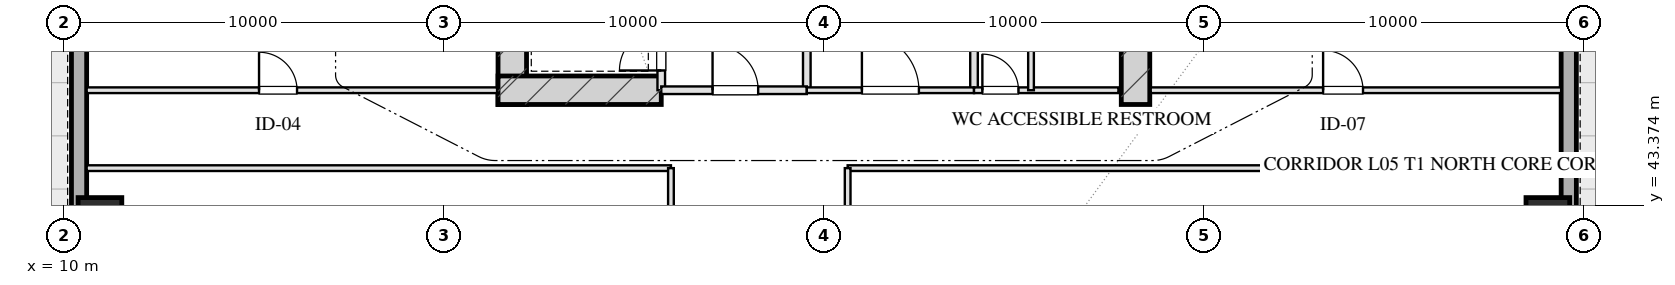
"""IFC4 building model, lengths in metres.
Left out: names, types, materials, properties, quantities, classifications, styles, units other than length and angle.
Written with IfcOpenShell. Run it as: python <this file> out.ifc"""

import sys

from ifc_helpers import new_model, si_unit, direction, frame, frame_2d, origin, origin_2d, place, context, subcontext, project, spatial, rectangle, hollow_rectangle, extrude, element, fill, save


model = new_model("IFC4")
c1 = context("Model", 3, precision=1e-05, world=origin(), true_north=direction((0.0, 1.0)))
c2 = subcontext(c1, "Body", "Model", "MODEL_VIEW")
j1 = project(units=[si_unit("LENGTHUNIT", "METRE"), si_unit("PLANEANGLEUNIT", "RADIAN")], contexts=[c1])
p1 = place(None, origin())
s1 = spatial("IfcSite", under=j1, at=p1, CompositionType="ELEMENT")
p2 = place(p1, origin())
s2 = spatial("IfcBuilding", under=s1, at=p2, CompositionType="ELEMENT")
p3 = place(p2, frame((0.0, 0.0, 26.0)))
s3 = spatial("IfcBuildingStorey", under=s2, at=p3, CompositionType="ELEMENT", Elevation=26.0)
for number, where, z_axis, x_axis in (
    (1, (21.8, 46.025, 0.0), (0.0, 0.0, 1.0), (0.0, 1.0, 0.0)),
    (2, (38.2, 46.025, 0.0), (0.0, 0.0, 1.0), (0.0, 1.0, 0.0)),
):
    element("IfcWall", number, at=place(p3, frame(where, z_axis=z_axis, x_axis=x_axis)), inside=s3, PredefinedType="SHEAR", context=c2, shape_type="SweptSolid", body=[
        extrude(rectangle(XDim=9.63, YDim=0.75, at=frame_2d((4.815, 0.0))), origin(), (0.0, 0.0, 1.0), 4.0),
    ])
p4 = place(p3, frame((21.425, 46.4, 0.0), z_axis=(0.0, 0.0, 1.0), x_axis=(1.0, 0.0, 0.0)))
e3 = element("IfcWall", 3, at=p4, inside=s3, PredefinedType="SHEAR", context=c2, shape_type="SweptSolid", body=[
    extrude(rectangle(XDim=4.295, YDim=0.75, at=frame_2d((2.147, 0.0))), origin(), (0.0, 0.0, 1.0), 4.0),
])
for number, where, z_axis, x_axis in (
    (4, (10.95, 43.0, 0.0), (0.0, 0.0, 1.0), (1.0, 0.0, 0.0)),
    (5, (49.05, 43.0, 0.0), (0.0, 0.0, 1.0), (1.0, 0.0, 0.0)),
):
    element("IfcColumn", number, at=place(p3, frame(where, z_axis=z_axis, x_axis=x_axis)), inside=s3, PredefinedType="COLUMN", context=c2, shape_type="SweptSolid", body=[
        extrude(hollow_rectangle(XDim=1.15, YDim=1.15, WallThickness=0.04, at=origin_2d()), origin(), (0.0, 0.0, 1.0), 4.001),
    ])
p5 = place(p3, frame((10.4, 7.2, 0.0), z_axis=(0.0, 0.0, 1.0), x_axis=(0.0, 1.0, 0.0)))
e6 = element("IfcWall", 6, at=p5, inside=s3, PredefinedType="SOLIDWALL", context=c2, shape_type="SweptSolid", body=[
    extrude(rectangle(XDim=53.6, YDim=0.4, at=frame_2d((26.8, 0.0))), origin(), (0.0, 0.0, 1.0), 3.16),
])
p6 = place(p5, frame((22.95, 0.0, 0.75)))
e7 = element("IfcOpeningElement", 7, at=p6, cuts=e6, PredefinedType="OPENING", context=c2, shape_type="SweptSolid", body=[
    extrude(rectangle(XDim=2.5, YDim=1.75, at=frame_2d((1.25, 0.875))), frame((0.0, 0.21, 0.0), z_axis=(0.0, -1.0, 0.0), x_axis=(1.0, 0.0, 0.0)), (0.0, 0.0, 1.0), 0.42),
])
p7 = place(p5, frame((28.15, 0.0, 0.75)))
e8 = element("IfcOpeningElement", 8, at=p7, cuts=e6, PredefinedType="OPENING", context=c2, shape_type="SweptSolid", body=[
    extrude(rectangle(XDim=2.5, YDim=1.75, at=frame_2d((1.25, 0.875))), frame((0.0, 0.21, 0.0), z_axis=(0.0, -1.0, 0.0), x_axis=(1.0, 0.0, 0.0)), (0.0, 0.0, 1.0), 0.42),
])
p8 = place(p3, frame((49.6, 60.8, 0.0), z_axis=(0.0, 0.0, 1.0), x_axis=(0.0, -1.0, 0.0)))
e9 = element("IfcWall", 9, at=p8, inside=s3, PredefinedType="SOLIDWALL", context=c2, shape_type="SweptSolid", body=[
    extrude(rectangle(XDim=53.6, YDim=0.4, at=frame_2d((26.8, 0.0))), origin(), (0.0, 0.0, 1.0), 3.16),
])
p9 = place(p8, frame((28.15, 0.0, 0.75)))
e10 = element("IfcOpeningElement", 10, at=p9, cuts=e9, PredefinedType="OPENING", context=c2, shape_type="SweptSolid", body=[
    extrude(rectangle(XDim=2.5, YDim=1.75, at=frame_2d((1.25, 0.875))), frame((0.0, 0.21, 0.0), z_axis=(0.0, -1.0, 0.0), x_axis=(1.0, 0.0, 0.0)), (0.0, 0.0, 1.0), 0.42),
])
p10 = place(p8, frame((22.95, 0.0, 0.75)))
e11 = element("IfcOpeningElement", 11, at=p10, cuts=e9, PredefinedType="OPENING", context=c2, shape_type="SweptSolid", body=[
    extrude(rectangle(XDim=2.5, YDim=1.75, at=frame_2d((1.25, 0.875))), frame((0.0, 0.21, 0.0), z_axis=(0.0, -1.0, 0.0), x_axis=(1.0, 0.0, 0.0)), (0.0, 0.0, 1.0), 0.42),
])
p11 = place(p3, frame((25.72, 46.4, 0.0), z_axis=(0.0, 0.0, 1.0), x_axis=(0.0, 1.0, 0.0)))
e12 = element("IfcWall", 12, at=p11, inside=s3, PredefinedType="PARTITIONING", context=c2, shape_type="SweptSolid", body=[
    extrude(rectangle(XDim=1.9, YDim=0.2, at=frame_2d((0.95, 0.0))), origin(), (0.0, 0.0, 1.0), 3.725),
])
p12 = place(p11, frame((0.52, 0.0, 0.0)))
e13 = element("IfcOpeningElement", 13, at=p12, cuts=e12, PredefinedType="OPENING", context=c2, shape_type="SweptSolid", body=[
    extrude(rectangle(XDim=1.1, YDim=2.05, at=frame_2d((0.55, 1.025))), frame((0.0, 0.11, 0.0), z_axis=(0.0, -1.0, 0.0), x_axis=(1.0, 0.0, 0.0)), (0.0, 0.0, 1.0), 0.22),
])
p13 = place(p3, frame((29.55, 46.4, 0.0), z_axis=(0.0, 0.0, 1.0), x_axis=(0.0, 1.0, 0.0)))
e14 = element("IfcWall", 14, at=p13, inside=s3, PredefinedType="PARTITIONING", context=c2, shape_type="SweptSolid", body=[
    extrude(rectangle(XDim=8.43, YDim=0.2, at=frame_2d((4.215, 0.0))), origin(), (0.0, 0.0, 1.0), 3.725),
])
p14 = place(p3, frame((25.72, 46.4, 0.0), z_axis=(0.0, 0.0, 1.0), x_axis=(1.0, 0.0, 0.0)))
e15 = element("IfcWall", 15, at=p14, inside=s3, PredefinedType="PARTITIONING", context=c2, shape_type="SweptSolid", body=[
    extrude(rectangle(XDim=3.83, YDim=0.2, at=frame_2d((1.915, 0.0))), origin(), (0.0, 0.0, 1.0), 3.725),
])
p15 = place(p14, frame((1.35, 0.0, 0.0)))
e16 = element("IfcOpeningElement", 16, at=p15, cuts=e15, PredefinedType="OPENING", context=c2, shape_type="SweptSolid", body=[
    extrude(rectangle(XDim=1.2, YDim=2.05, at=frame_2d((0.6, 1.025))), frame((0.0, 0.11, 0.0), z_axis=(0.0, -1.0, 0.0), x_axis=(1.0, 0.0, 0.0)), (0.0, 0.0, 1.0), 0.22),
])
p16 = place(p3, frame((33.95, 46.4, 0.0), z_axis=(0.0, 0.0, 1.0), x_axis=(0.0, 1.0, 0.0)))
e17 = element("IfcWall", 17, at=p16, inside=s3, PredefinedType="PARTITIONING", context=c2, shape_type="SweptSolid", body=[
    extrude(rectangle(XDim=8.43, YDim=0.2, at=frame_2d((4.215, 0.0))), origin(), (0.0, 0.0, 1.0), 3.725),
])
p17 = place(p3, frame((29.55, 46.4, 0.0), z_axis=(0.0, 0.0, 1.0), x_axis=(1.0, 0.0, 0.0)))
e18 = element("IfcWall", 18, at=p17, inside=s3, PredefinedType="PARTITIONING", context=c2, shape_type="SweptSolid", body=[
    extrude(rectangle(XDim=4.4, YDim=0.15, at=frame_2d((2.2, 0.0))), origin(), (0.0, 0.0, 1.0), 3.725),
])
p18 = place(p17, frame((1.45, 0.0, 0.0)))
e19 = element("IfcOpeningElement", 19, at=p18, cuts=e18, PredefinedType="OPENING", context=c2, shape_type="SweptSolid", body=[
    extrude(rectangle(XDim=1.5, YDim=2.05, at=frame_2d((0.75, 1.025))), frame((0.0, 0.085, 0.0), z_axis=(0.0, -1.0, 0.0), x_axis=(1.0, 0.0, 0.0)), (0.0, 0.0, 1.0), 0.17),
])
p19 = place(p3, frame((33.95, 46.4, 0.0), z_axis=(0.0, 0.0, 1.0), x_axis=(1.0, 0.0, 0.0)))
e20 = element("IfcWall", 20, at=p19, inside=s3, PredefinedType="PARTITIONING", context=c2, shape_type="SweptSolid", body=[
    extrude(rectangle(XDim=3.8, YDim=0.15, at=frame_2d((1.9, 0.0))), origin(), (0.0, 0.0, 1.0), 3.725),
])
p20 = place(p19, frame((0.22, 0.0, 0.0)))
e21 = element("IfcOpeningElement", 21, at=p20, cuts=e20, PredefinedType="OPENING", context=c2, shape_type="SweptSolid", body=[
    extrude(rectangle(XDim=0.95, YDim=2.05, at=frame_2d((0.475, 1.025))), frame((0.0, 0.085, 0.0), z_axis=(0.0, -1.0, 0.0), x_axis=(1.0, 0.0, 0.0)), (0.0, 0.0, 1.0), 0.17),
])
p21 = place(p3, frame((35.45, 46.4, 0.0), z_axis=(0.0, 0.0, 1.0), x_axis=(0.0, 1.0, 0.0)))
e22 = element("IfcWall", 22, at=p21, inside=s3, PredefinedType="PARTITIONING", context=c2, shape_type="SweptSolid", body=[
    extrude(rectangle(XDim=8.43, YDim=0.15, at=frame_2d((4.215, 0.0))), origin(), (0.0, 0.0, 1.0), 3.365),
])
p22 = place(p21, frame((2.55, 0.0, 0.0)))
e23 = element("IfcOpeningElement", 23, at=p22, cuts=e22, PredefinedType="OPENING", context=c2, shape_type="SweptSolid", body=[
    extrude(rectangle(XDim=0.95, YDim=2.05, at=frame_2d((0.475, 1.025))), frame((0.0, 0.085, 0.0), z_axis=(0.0, -1.0, 0.0), x_axis=(1.0, 0.0, 0.0)), (0.0, 0.0, 1.0), 0.17),
])
p23 = place(p21, frame((5.8, 0.0, 0.0)))
e24 = element("IfcOpeningElement", 24, at=p23, cuts=e22, PredefinedType="OPENING", context=c2, shape_type="SweptSolid", body=[
    extrude(rectangle(XDim=0.9, YDim=2.05, at=frame_2d((0.45, 1.025))), frame((0.0, 0.085, 0.0), z_axis=(0.0, -1.0, 0.0), x_axis=(1.0, 0.0, 0.0)), (0.0, 0.0, 1.0), 0.17),
])
p24 = place(p3, frame((10.6, 46.4, 0.0), z_axis=(0.0, 0.0, 1.0), x_axis=(1.0, 0.0, 0.0)))
e25 = element("IfcWall", 25, at=p24, inside=s3, PredefinedType="PARTITIONING", context=c2, shape_type="SweptSolid", body=[
    extrude(rectangle(XDim=10.8, YDim=0.15, at=frame_2d((5.4, 0.0))), origin(), (0.0, 0.0, 1.0), 3.725),
])
p25 = place(p24, frame((4.536, 0.0, 0.0)))
e26 = element("IfcOpeningElement", 26, at=p25, cuts=e25, PredefinedType="OPENING", context=c2, shape_type="SweptSolid", body=[
    extrude(rectangle(XDim=1.0, YDim=2.05, at=frame_2d((0.5, 1.025))), frame((0.0, 0.085, 0.0), z_axis=(0.0, -1.0, 0.0), x_axis=(1.0, 0.0, 0.0)), (0.0, 0.0, 1.0), 0.17),
])
p26 = place(p3, frame((38.6, 46.4, 0.0), z_axis=(0.0, 0.0, 1.0), x_axis=(1.0, 0.0, 0.0)))
e27 = element("IfcWall", 27, at=p26, inside=s3, PredefinedType="PARTITIONING", context=c2, shape_type="SweptSolid", body=[
    extrude(rectangle(XDim=10.8, YDim=0.15, at=frame_2d((5.4, 0.0))), origin(), (0.0, 0.0, 1.0), 3.725),
])
p27 = place(p26, frame((4.536, 0.0, 0.0)))
e28 = element("IfcOpeningElement", 28, at=p27, cuts=e27, PredefinedType="OPENING", context=c2, shape_type="SweptSolid", body=[
    extrude(rectangle(XDim=1.05, YDim=2.05, at=frame_2d((0.525, 1.025))), frame((0.0, 0.085, 0.0), z_axis=(0.0, -1.0, 0.0), x_axis=(1.0, 0.0, 0.0)), (0.0, 0.0, 1.0), 0.17),
])
p28 = place(p3, frame((10.6, 44.35, 0.0), z_axis=(0.0, 0.0, 1.0), x_axis=(1.0, 0.0, 0.0)))
e29 = element("IfcWall", 29, at=p28, inside=s3, PredefinedType="PARTITIONING", context=c2, shape_type="SweptSolid", body=[
    extrude(rectangle(XDim=15.375, YDim=0.15, at=frame_2d((7.688, 0.0))), origin(), (0.0, 0.0, 1.0), 3.725),
])
p29 = place(p3, frame((30.625, 44.35, 0.0), z_axis=(0.0, 0.0, 1.0), x_axis=(1.0, 0.0, 0.0)))
e30 = element("IfcWall", 30, at=p29, inside=s3, PredefinedType="PARTITIONING", context=c2, shape_type="SweptSolid", body=[
    extrude(rectangle(XDim=18.775, YDim=0.15, at=frame_2d((9.387, 0.0))), origin(), (0.0, 0.0, 1.0), 3.725),
])
p30 = place(p3, frame((25.975, 23.65, 0.0), z_axis=(0.0, 0.0, 1.0), x_axis=(0.0, 1.0, 0.0)))
e31 = element("IfcWall", 31, at=p30, inside=s3, PredefinedType="PARTITIONING", context=c2, shape_type="SweptSolid", body=[
    extrude(rectangle(XDim=20.7, YDim=0.15, at=frame_2d((10.35, 0.0))), origin(), (0.0, 0.0, 1.0), 3.725),
])
p31 = place(p30, frame((2.175, 0.0, 0.0)))
e32 = element("IfcOpeningElement", 32, at=p31, cuts=e31, PredefinedType="OPENING", context=c2, shape_type="SweptSolid", body=[
    extrude(rectangle(XDim=1.0, YDim=2.05, at=frame_2d((0.5, 1.025))), frame((0.0, 0.085, 0.0), z_axis=(0.0, -1.0, 0.0), x_axis=(1.0, 0.0, 0.0)), (0.0, 0.0, 1.0), 0.17),
])
p32 = place(p30, frame((7.69, 0.0, 0.0)))
e33 = element("IfcOpeningElement", 33, at=p32, cuts=e31, PredefinedType="OPENING", context=c2, shape_type="SweptSolid", body=[
    extrude(rectangle(XDim=1.0, YDim=2.05, at=frame_2d((0.5, 1.025))), frame((0.0, 0.085, 0.0), z_axis=(0.0, -1.0, 0.0), x_axis=(1.0, 0.0, 0.0)), (0.0, 0.0, 1.0), 0.17),
])
p33 = place(p30, frame((12.69, 0.0, 0.0)))
e34 = element("IfcOpeningElement", 34, at=p33, cuts=e31, PredefinedType="OPENING", context=c2, shape_type="SweptSolid", body=[
    extrude(rectangle(XDim=1.0, YDim=2.05, at=frame_2d((0.5, 1.025))), frame((0.0, 0.085, 0.0), z_axis=(0.0, -1.0, 0.0), x_axis=(1.0, 0.0, 0.0)), (0.0, 0.0, 1.0), 0.17),
])
p34 = place(p30, frame((17.525, 0.0, 0.0)))
e35 = element("IfcOpeningElement", 35, at=p34, cuts=e31, PredefinedType="OPENING", context=c2, shape_type="SweptSolid", body=[
    extrude(rectangle(XDim=1.0, YDim=2.05, at=frame_2d((0.5, 1.025))), frame((0.0, 0.085, 0.0), z_axis=(0.0, -1.0, 0.0), x_axis=(1.0, 0.0, 0.0)), (0.0, 0.0, 1.0), 0.17),
])
p35 = place(p3, frame((30.625, 23.65, 0.0), z_axis=(0.0, 0.0, 1.0), x_axis=(0.0, 1.0, 0.0)))
e36 = element("IfcWall", 36, at=p35, inside=s3, PredefinedType="PARTITIONING", context=c2, shape_type="SweptSolid", body=[
    extrude(rectangle(XDim=20.7, YDim=0.15, at=frame_2d((10.35, 0.0))), origin(), (0.0, 0.0, 1.0), 3.725),
])
p36 = place(p35, frame((2.191, 0.0, 0.0)))
e37 = element("IfcOpeningElement", 37, at=p36, cuts=e36, PredefinedType="OPENING", context=c2, shape_type="SweptSolid", body=[
    extrude(rectangle(XDim=1.0, YDim=2.05, at=frame_2d((0.5, 1.025))), frame((0.0, 0.085, 0.0), z_axis=(0.0, -1.0, 0.0), x_axis=(1.0, 0.0, 0.0)), (0.0, 0.0, 1.0), 0.17),
])
p37 = place(p35, frame((7.78, 0.0, 0.0)))
e38 = element("IfcOpeningElement", 38, at=p37, cuts=e36, PredefinedType="OPENING", context=c2, shape_type="SweptSolid", body=[
    extrude(rectangle(XDim=1.0, YDim=2.05, at=frame_2d((0.5, 1.025))), frame((0.0, 0.085, 0.0), z_axis=(0.0, -1.0, 0.0), x_axis=(1.0, 0.0, 0.0)), (0.0, 0.0, 1.0), 0.17),
])
p38 = place(p35, frame((12.764, 0.0, 0.0)))
e39 = element("IfcOpeningElement", 39, at=p38, cuts=e36, PredefinedType="OPENING", context=c2, shape_type="SweptSolid", body=[
    extrude(rectangle(XDim=1.05, YDim=2.05, at=frame_2d((0.525, 1.025))), frame((0.0, 0.085, 0.0), z_axis=(0.0, -1.0, 0.0), x_axis=(1.0, 0.0, 0.0)), (0.0, 0.0, 1.0), 0.17),
])
p39 = place(p35, frame((17.525, 0.0, 0.0)))
e40 = element("IfcOpeningElement", 40, at=p39, cuts=e36, PredefinedType="OPENING", context=c2, shape_type="SweptSolid", body=[
    extrude(rectangle(XDim=1.0, YDim=2.05, at=frame_2d((0.5, 1.025))), frame((0.0, 0.085, 0.0), z_axis=(0.0, -1.0, 0.0), x_axis=(1.0, 0.0, 0.0)), (0.0, 0.0, 1.0), 0.17),
])
p40 = place(p12, origin())
e41 = element("IfcDoor", 41, at=p40, inside=s3, OperationType="SINGLE_SWING_LEFT", PredefinedType="DOOR", context=c2, shape_type="SweptSolid", body=[
    extrude(rectangle(XDim=1.1, YDim=2.05, at=frame_2d((0.55, 1.025))), frame((0.0, 0.025, 0.0), z_axis=(0.0, -1.0, 0.0), x_axis=(1.0, 0.0, 0.0)), (0.0, 0.0, 1.0), 0.05),
])
fill(e13, e41)
p41 = place(p15, origin())
e42 = element("IfcDoor", 42, at=p41, inside=s3, OperationType="SINGLE_SWING_LEFT", PredefinedType="DOOR", context=c2, shape_type="SweptSolid", body=[
    extrude(rectangle(XDim=1.2, YDim=2.05, at=frame_2d((0.6, 1.025))), frame((0.0, 0.025, 0.0), z_axis=(0.0, -1.0, 0.0), x_axis=(1.0, 0.0, 0.0)), (0.0, 0.0, 1.0), 0.05),
])
fill(e16, e42)
p42 = place(p18, origin())
e43 = element("IfcDoor", 43, at=p42, inside=s3, OperationType="SINGLE_SWING_LEFT", PredefinedType="DOOR", context=c2, shape_type="SweptSolid", body=[
    extrude(rectangle(XDim=1.5, YDim=2.05, at=frame_2d((0.75, 1.025))), frame((0.0, 0.025, 0.0), z_axis=(0.0, -1.0, 0.0), x_axis=(1.0, 0.0, 0.0)), (0.0, 0.0, 1.0), 0.05),
])
fill(e19, e43)
p43 = place(p20, origin())
e44 = element("IfcDoor", 44, at=p43, inside=s3, OperationType="SINGLE_SWING_LEFT", PredefinedType="DOOR", context=c2, shape_type="SweptSolid", body=[
    extrude(rectangle(XDim=0.95, YDim=2.05, at=frame_2d((0.475, 1.025))), frame((0.0, 0.025, 0.0), z_axis=(0.0, -1.0, 0.0), x_axis=(1.0, 0.0, 0.0)), (0.0, 0.0, 1.0), 0.05),
])
fill(e21, e44)
p44 = place(p25, origin())
e45 = element("IfcDoor", 45, at=p44, inside=s3, OperationType="SINGLE_SWING_LEFT", PredefinedType="DOOR", context=c2, shape_type="SweptSolid", body=[
    extrude(rectangle(XDim=1.0, YDim=2.05, at=frame_2d((0.5, 1.025))), frame((0.0, 0.025, 0.0), z_axis=(0.0, -1.0, 0.0), x_axis=(1.0, 0.0, 0.0)), (0.0, 0.0, 1.0), 0.05),
])
fill(e26, e45)
p45 = place(p27, origin())
e46 = element("IfcDoor", 46, at=p45, inside=s3, OperationType="SINGLE_SWING_LEFT", PredefinedType="DOOR", context=c2, shape_type="SweptSolid", body=[
    extrude(rectangle(XDim=1.05, YDim=2.05, at=frame_2d((0.525, 1.025))), frame((0.0, 0.025, 0.0), z_axis=(0.0, -1.0, 0.0), x_axis=(1.0, 0.0, 0.0)), (0.0, 0.0, 1.0), 0.05),
])
fill(e28, e46)
save(model, sys.argv[1])
